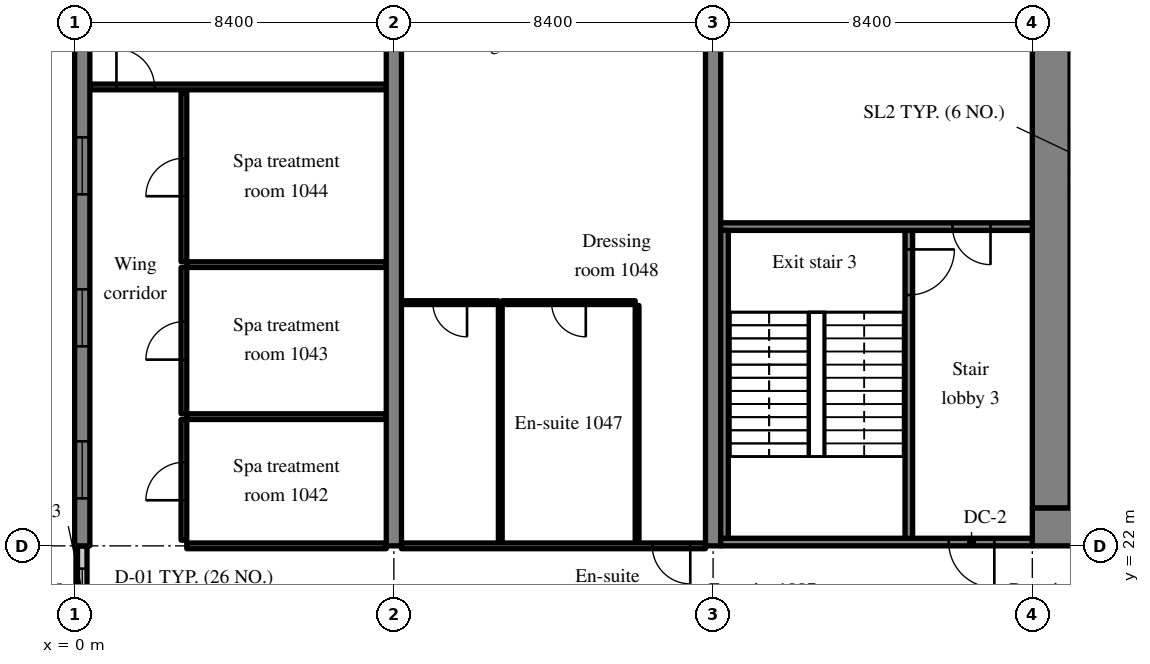
"""IFC4 building model, lengths in metres.
Left out: names, types, materials, properties, quantities, classifications, styles, units other than length and angle.
Written with IfcOpenShell. Run it as: python <this file> out.ifc"""

import sys

from ifc_helpers import new_model, si_unit, direction, frame, frame_2d, origin, place, context, subcontext, project, spatial, rectangle, extrude, source, transform, mapped, element, fill, save


model = new_model("IFC4")
c1 = context("Model", 3, precision=1e-05, world=origin(), true_north=direction((0.0, 1.0)))
c2 = subcontext(c1, "Body", "Model", "MODEL_VIEW")
j1 = project(units=[si_unit("LENGTHUNIT", "METRE"), si_unit("PLANEANGLEUNIT", "RADIAN")], contexts=[c1])
p1 = place(None, origin())
s1 = spatial("IfcSite", under=j1, at=p1, CompositionType="ELEMENT")
p2 = place(p1, origin())
s2 = spatial("IfcBuilding", under=s1, at=p2, CompositionType="ELEMENT")
p3 = place(p2, frame((0.0, 0.0, 46.8)))
s3 = spatial("IfcBuildingStorey", under=s2, at=p3, CompositionType="ELEMENT", Elevation=46.8)
m1 = source(origin(), c2, "Body", "SweptSolid", [
    extrude(rectangle(XDim=50.4, YDim=1.0, at=frame_2d((25.2, 0.0))), origin(), (0.0, 0.0, 1.0), 3.52),
])
p4 = place(p3, frame((25.2, 22.5, 0.0), z_axis=(0.0, 0.0, 1.0), x_axis=(1.0, 0.0, 0.0)))
e1 = element("IfcWall", 1, at=p4, inside=s3, PredefinedType="SHEAR", context=c2, shape_type="MappedRepresentation", body=[
    mapped(m1, transform((0.0, 0.0, 0.0), scale=1.0)),
])
m2 = source(origin(), c2, "Body", "SweptSolid", [
    extrude(rectangle(XDim=1.8, YDim=2.1, at=frame_2d((0.9, 1.05))), frame((0.0, 0.51, 0.0), z_axis=(0.0, -1.0, 0.0), x_axis=(1.0, 0.0, 0.0)), (0.0, 0.0, 1.0), 1.02),
])
p5 = place(p4, frame((15.9, 0.0, 0.0)))
e2 = element("IfcOpeningElement", 2, at=p5, cuts=e1, PredefinedType="OPENING", context=c2, shape_type="MappedRepresentation", body=[
    mapped(m2, transform((0.0, 0.0, 0.0), scale=1.0)),
])
m3 = source(origin(), c2, "Body", "SweptSolid", [
    extrude(rectangle(XDim=1.2, YDim=2.1, at=frame_2d((0.6, 1.05))), frame((0.0, 0.51, 0.0), z_axis=(0.0, -1.0, 0.0), x_axis=(1.0, 0.0, 0.0)), (0.0, 0.0, 1.0), 1.02),
])
p6 = place(p4, frame((26.987, 0.0, 0.0)))
e3 = element("IfcOpeningElement", 3, at=p6, cuts=e1, PredefinedType="OPENING", context=c2, shape_type="MappedRepresentation", body=[
    mapped(m3, transform((0.0, 0.0, 0.0), scale=1.0)),
])
m4 = source(origin(), c2, "Body", "SweptSolid", [
    extrude(rectangle(XDim=0.9, YDim=2.1, at=frame_2d((0.45, 1.05))), frame((0.0, 0.51, 0.0), z_axis=(0.0, -1.0, 0.0), x_axis=(1.0, 0.0, 0.0)), (0.0, 0.0, 1.0), 1.02),
])
p7 = place(p4, frame((33.75, 0.0, 0.0)))
e4 = element("IfcOpeningElement", 4, at=p7, cuts=e1, PredefinedType="OPENING", context=c2, shape_type="MappedRepresentation", body=[
    mapped(m4, transform((0.0, 0.0, 0.0), scale=1.0)),
])
p8 = place(p4, frame((30.75, 0.0, 0.0)))
e5 = element("IfcOpeningElement", 5, at=p8, cuts=e1, PredefinedType="OPENING", context=c2, shape_type="MappedRepresentation", body=[
    mapped(m4, transform((0.0, 0.0, 0.0), scale=1.0)),
])
p9 = place(p4, frame((38.262, 0.0, 0.0)))
e6 = element("IfcOpeningElement", 6, at=p9, cuts=e1, PredefinedType="OPENING", context=c2, shape_type="MappedRepresentation", body=[
    mapped(m4, transform((0.0, 0.0, 0.0), scale=1.0)),
])
p10 = place(p4, frame((6.438, 0.0, 0.0)))
e7 = element("IfcOpeningElement", 7, at=p10, cuts=e1, PredefinedType="OPENING", context=c2, shape_type="MappedRepresentation", body=[
    mapped(m3, transform((0.0, 0.0, 0.0), scale=1.0)),
])
p11 = place(p4, frame((47.725, 0.0, 0.0)))
e8 = element("IfcOpeningElement", 8, at=p11, cuts=e1, PredefinedType="OPENING", context=c2, shape_type="MappedRepresentation", body=[
    mapped(m3, transform((0.0, 0.0, 0.0), scale=1.0)),
])
m5 = source(origin(), c2, "Body", "SweptSolid", [
    extrude(rectangle(XDim=18.0, YDim=1.0, at=frame_2d((9.0, 0.0))), origin(), (0.0, 0.0, 1.0), 3.52),
])
p12 = place(p3, frame((25.7, 23.0, 0.0), z_axis=(0.0, 0.0, 1.0), x_axis=(0.0, 1.0, 0.0)))
e9 = element("IfcWall", 9, at=p12, inside=s3, PredefinedType="SHEAR", context=c2, shape_type="MappedRepresentation", body=[
    mapped(m5, transform((0.0, 0.0, 0.0), scale=1.0)),
])
m6 = source(origin(), c2, "Body", "SweptSolid", [
    extrude(rectangle(XDim=16.0, YDim=0.4, at=frame_2d((8.0, 0.0))), origin(), (0.0, 0.0, 1.0), 3.52),
])
p13 = place(p3, frame((0.2, 22.0, 0.0), z_axis=(0.0, 0.0, 1.0), x_axis=(0.0, 1.0, 0.0)))
e10 = element("IfcWall", 10, at=p13, inside=s3, PredefinedType="SHEAR", context=c2, shape_type="MappedRepresentation", body=[
    mapped(m6, transform((0.0, 0.0, 0.0), scale=1.0)),
])
m7 = source(origin(), c2, "Body", "SweptSolid", [
    extrude(rectangle(XDim=1.5, YDim=1.5, at=frame_2d((0.75, 0.75))), frame((0.0, 0.21, 0.0), z_axis=(0.0, -1.0, 0.0), x_axis=(1.0, 0.0, 0.0)), (0.0, 0.0, 1.0), 0.42),
])
p14 = place(p13, frame((1.25, 0.0, 0.9)))
e11 = element("IfcOpeningElement", 11, at=p14, cuts=e10, PredefinedType="OPENING", context=c2, shape_type="MappedRepresentation", body=[
    mapped(m7, transform((0.0, 0.0, 0.0), scale=1.0)),
])
p15 = place(p13, frame((5.25, 0.0, 0.9)))
e12 = element("IfcOpeningElement", 12, at=p15, cuts=e10, PredefinedType="OPENING", context=c2, shape_type="MappedRepresentation", body=[
    mapped(m7, transform((0.0, 0.0, 0.0), scale=1.0)),
])
p16 = place(p13, frame((9.25, 0.0, 0.9)))
e13 = element("IfcOpeningElement", 13, at=p16, cuts=e10, PredefinedType="OPENING", context=c2, shape_type="MappedRepresentation", body=[
    mapped(m7, transform((0.0, 0.0, 0.0), scale=1.0)),
])
p17 = place(p13, frame((13.25, 0.0, 0.9)))
e14 = element("IfcOpeningElement", 14, at=p17, cuts=e10, PredefinedType="OPENING", context=c2, shape_type="MappedRepresentation", body=[
    mapped(m7, transform((0.0, 0.0, 0.0), scale=1.0)),
])
m8 = source(origin(), c2, "Body", "SweptSolid", [
    extrude(rectangle(XDim=20.0, YDim=0.4, at=frame_2d((10.0, 0.0))), origin(), (0.0, 0.0, 1.0), 3.52),
])
for number, where, z_axis, x_axis in (
    (15, (8.4, 22.0, 0.0), (0.0, 0.0, 1.0), (0.0, 1.0, 0.0)),
    (16, (16.8, 22.0, 0.0), (0.0, 0.0, 1.0), (0.0, 1.0, 0.0)),
):
    element("IfcWall", number, at=place(p3, frame(where, z_axis=z_axis, x_axis=x_axis)), inside=s3, PredefinedType="SHEAR", context=c2, shape_type="MappedRepresentation", body=[
        mapped(m8, transform((0.0, 0.0, 0.0), scale=1.0)),
    ])
m9 = source(origin(), c2, "Body", "SweptSolid", [
    extrude(rectangle(XDim=2.4, YDim=0.25, at=frame_2d((1.2, 0.0))), origin(), (0.0, 0.0, 1.0), 2.62),
])
p18 = place(p3, frame((0.2, 19.6, 0.0), z_axis=(0.0, 0.0, 1.0), x_axis=(0.0, 1.0, 0.0)))
e17 = element("IfcWall", 17, at=p18, inside=s3, PredefinedType="SOLIDWALL", context=c2, shape_type="MappedRepresentation", body=[
    mapped(m9, transform((0.0, 0.0, 0.0), scale=1.0)),
])
m10 = source(origin(), c2, "Body", "SweptSolid", [
    extrude(rectangle(XDim=1.2, YDim=1.5, at=frame_2d((0.6, 0.75))), frame((0.0, 0.135, 0.0), z_axis=(0.0, -1.0, 0.0), x_axis=(1.0, 0.0, 0.0)), (0.0, 0.0, 1.0), 0.27),
])
p19 = place(p18, frame((0.6, 0.0, 0.9)))
e18 = element("IfcOpeningElement", 18, at=p19, cuts=e17, PredefinedType="OPENING", context=c2, shape_type="MappedRepresentation", body=[
    mapped(m10, transform((0.0, 0.0, 0.0), scale=1.0)),
])
m11 = source(origin(), c2, "Body", "SweptSolid", [
    extrude(rectangle(XDim=8.3, YDim=0.2, at=frame_2d((4.15, 0.0))), origin(), (0.0, 0.0, 1.0), 3.52),
])
p20 = place(p3, frame((21.95, 22.1, 0.0), z_axis=(0.0, 0.0, 1.0), x_axis=(0.0, 1.0, 0.0)))
e19 = element("IfcWall", 19, at=p20, inside=s3, PredefinedType="SOLIDWALL", context=c2, shape_type="MappedRepresentation", body=[
    mapped(m11, transform((0.0, 0.0, 0.0), scale=1.0)),
])
m12 = source(origin(), c2, "Body", "SweptSolid", [
    extrude(rectangle(XDim=1.2, YDim=2.1, at=frame_2d((0.6, 1.05))), frame((0.0, 0.11, 0.0), z_axis=(0.0, -1.0, 0.0), x_axis=(1.0, 0.0, 0.0)), (0.0, 0.0, 1.0), 0.22),
])
p21 = place(p20, frame((6.5, 0.0, 0.0)))
e20 = element("IfcOpeningElement", 20, at=p21, cuts=e19, PredefinedType="OPENING", context=c2, shape_type="MappedRepresentation", body=[
    mapped(m12, transform((0.0, 0.0, 0.0), scale=1.0)),
])
m13 = source(origin(), c2, "Body", "SweptSolid", [
    extrude(rectangle(XDim=8.2, YDim=0.2, at=frame_2d((4.1, 0.0))), origin(), (0.0, 0.0, 1.0), 3.52),
])
p22 = place(p3, frame((17.0, 22.1, 0.0), z_axis=(0.0, 0.0, 1.0), x_axis=(1.0, 0.0, 0.0)))
e21 = element("IfcWall", 21, at=p22, inside=s3, PredefinedType="SOLIDWALL", context=c2, shape_type="MappedRepresentation", body=[
    mapped(m13, transform((0.0, 0.0, 0.0), scale=1.0)),
])
p23 = place(p22, frame((6.0, 0.0, 0.0)))
e22 = element("IfcOpeningElement", 22, at=p23, cuts=e21, PredefinedType="OPENING", context=c2, shape_type="MappedRepresentation", body=[
    mapped(m12, transform((0.0, 0.0, 0.0), scale=1.0)),
])
p24 = place(p3, frame((17.0, 30.4, 0.0), z_axis=(0.0, 0.0, 1.0), x_axis=(1.0, 0.0, 0.0)))
e23 = element("IfcWall", 23, at=p24, inside=s3, PredefinedType="SOLIDWALL", context=c2, shape_type="MappedRepresentation", body=[
    mapped(m13, transform((0.0, 0.0, 0.0), scale=1.0)),
])
m14 = source(origin(), c2, "Body", "SweptSolid", [
    extrude(rectangle(XDim=1.0, YDim=2.1, at=frame_2d((0.5, 1.05))), frame((0.0, 0.11, 0.0), z_axis=(0.0, -1.0, 0.0), x_axis=(1.0, 0.0, 0.0)), (0.0, 0.0, 1.0), 0.22),
])
p25 = place(p24, frame((6.1, 0.0, 0.0)))
e24 = element("IfcOpeningElement", 24, at=p25, cuts=e23, PredefinedType="OPENING", context=c2, shape_type="MappedRepresentation", body=[
    mapped(m14, transform((0.0, 0.0, 0.0), scale=1.0)),
])
m15 = source(origin(), c2, "Body", "SweptSolid", [
    extrude(rectangle(XDim=8.1, YDim=0.2, at=frame_2d((4.05, 0.0))), origin(), (0.0, 0.0, 1.0), 3.52),
])
p26 = place(p3, frame((17.1, 22.2, 0.0), z_axis=(0.0, 0.0, 1.0), x_axis=(0.0, 1.0, 0.0)))
e25 = element("IfcWall", 25, at=p26, inside=s3, PredefinedType="SOLIDWALL", context=c2, shape_type="MappedRepresentation", body=[
    mapped(m15, transform((0.0, 0.0, 0.0), scale=1.0)),
])
m16 = source(origin(), c2, "Body", "SweptSolid", [
    extrude(rectangle(XDim=5.25, YDim=0.15, at=frame_2d((2.625, 0.0))), origin(), (0.0, 0.0, 1.0), 2.82),
])
p27 = place(p3, frame((2.95, 22.0, 0.0), z_axis=(0.0, 0.0, 1.0), x_axis=(1.0, 0.0, 0.0)))
e26 = element("IfcWall", 26, at=p27, inside=s3, PredefinedType="PARTITIONING", context=c2, shape_type="MappedRepresentation", body=[
    mapped(m16, transform((0.0, 0.0, 0.0), scale=1.0)),
])
m17 = source(origin(), c2, "Body", "SweptSolid", [
    extrude(rectangle(XDim=3.175, YDim=0.15, at=frame_2d((1.587, 0.0))), origin(), (0.0, 0.0, 1.0), 3.52),
])
p28 = place(p3, frame((2.875, 22.15, 0.0), z_axis=(0.0, 0.0, 1.0), x_axis=(0.0, 1.0, 0.0)))
e27 = element("IfcWall", 27, at=p28, inside=s3, PredefinedType="PARTITIONING", context=c2, shape_type="MappedRepresentation", body=[
    mapped(m17, transform((0.0, 0.0, 0.0), scale=1.0)),
])
m18 = source(origin(), c2, "Body", "SweptSolid", [
    extrude(rectangle(XDim=1.0, YDim=2.1, at=frame_2d((0.5, 1.05))), frame((0.0, 0.085, 0.0), z_axis=(0.0, -1.0, 0.0), x_axis=(1.0, 0.0, 0.0)), (0.0, 0.0, 1.0), 0.17),
])
p29 = place(p28, frame((1.05, 0.0, 0.0)))
e28 = element("IfcOpeningElement", 28, at=p29, cuts=e27, PredefinedType="OPENING", context=c2, shape_type="MappedRepresentation", body=[
    mapped(m18, transform((0.0, 0.0, 0.0), scale=1.0)),
])
m19 = source(origin(), c2, "Body", "SweptSolid", [
    extrude(rectangle(XDim=5.25, YDim=0.15, at=frame_2d((2.625, 0.0))), origin(), (0.0, 0.0, 1.0), 3.52),
])
p30 = place(p3, frame((2.95, 25.4, 0.0), z_axis=(0.0, 0.0, 1.0), x_axis=(1.0, 0.0, 0.0)))
e29 = element("IfcWall", 29, at=p30, inside=s3, PredefinedType="PARTITIONING", context=c2, shape_type="MappedRepresentation", body=[
    mapped(m19, transform((0.0, 0.0, 0.0), scale=1.0)),
])
m20 = source(origin(), c2, "Body", "SweptSolid", [
    extrude(rectangle(XDim=3.85, YDim=0.15, at=frame_2d((1.925, 0.0))), origin(), (0.0, 0.0, 1.0), 3.52),
])
p31 = place(p3, frame((2.875, 25.475, 0.0), z_axis=(0.0, 0.0, 1.0), x_axis=(0.0, 1.0, 0.0)))
e30 = element("IfcWall", 30, at=p31, inside=s3, PredefinedType="PARTITIONING", context=c2, shape_type="MappedRepresentation", body=[
    mapped(m20, transform((0.0, 0.0, 0.0), scale=1.0)),
])
p32 = place(p31, frame((1.425, 0.0, 0.0)))
e31 = element("IfcOpeningElement", 31, at=p32, cuts=e30, PredefinedType="OPENING", context=c2, shape_type="MappedRepresentation", body=[
    mapped(m18, transform((0.0, 0.0, 0.0), scale=1.0)),
])
p33 = place(p3, frame((2.95, 29.4, 0.0), z_axis=(0.0, 0.0, 1.0), x_axis=(1.0, 0.0, 0.0)))
e32 = element("IfcWall", 32, at=p33, inside=s3, PredefinedType="PARTITIONING", context=c2, shape_type="MappedRepresentation", body=[
    mapped(m19, transform((0.0, 0.0, 0.0), scale=1.0)),
])
m21 = source(origin(), c2, "Body", "SweptSolid", [
    extrude(rectangle(XDim=4.45, YDim=0.15, at=frame_2d((2.225, 0.0))), origin(), (0.0, 0.0, 1.0), 3.52),
])
p34 = place(p3, frame((2.875, 29.475, 0.0), z_axis=(0.0, 0.0, 1.0), x_axis=(0.0, 1.0, 0.0)))
e33 = element("IfcWall", 33, at=p34, inside=s3, PredefinedType="PARTITIONING", context=c2, shape_type="MappedRepresentation", body=[
    mapped(m21, transform((0.0, 0.0, 0.0), scale=1.0)),
])
p35 = place(p34, frame((1.725, 0.0, 0.0)))
e34 = element("IfcOpeningElement", 34, at=p35, cuts=e33, PredefinedType="OPENING", context=c2, shape_type="MappedRepresentation", body=[
    mapped(m18, transform((0.0, 0.0, 0.0), scale=1.0)),
])
m22 = source(origin(), c2, "Body", "SweptSolid", [
    extrude(rectangle(XDim=7.8, YDim=0.15, at=frame_2d((3.9, 0.0))), origin(), (0.0, 0.0, 1.0), 3.52),
])
p36 = place(p3, frame((0.4, 34.075, 0.0), z_axis=(0.0, 0.0, 1.0), x_axis=(1.0, 0.0, 0.0)))
e35 = element("IfcWall", 35, at=p36, inside=s3, PredefinedType="PARTITIONING", context=c2, shape_type="MappedRepresentation", body=[
    mapped(m22, transform((0.0, 0.0, 0.0), scale=1.0)),
])
p37 = place(p36, frame((0.7, 0.0, 0.0)))
e36 = element("IfcOpeningElement", 36, at=p37, cuts=e35, PredefinedType="OPENING", context=c2, shape_type="MappedRepresentation", body=[
    mapped(m18, transform((0.0, 0.0, 0.0), scale=1.0)),
])
m23 = source(origin(), c2, "Body", "SweptSolid", [
    extrude(rectangle(XDim=6.25, YDim=0.1, at=frame_2d((3.125, 0.0))), origin(), (0.0, 0.0, 1.0), 3.52),
])
for number, where, z_axis, x_axis in (
    (37, (14.8, 22.075, 0.0), (0.0, 0.0, 1.0), (0.0, 1.0, 0.0)),
    (38, (11.2, 22.075, 0.0), (0.0, 0.0, 1.0), (0.0, 1.0, 0.0)),
):
    element("IfcWall", number, at=place(p3, frame(where, z_axis=z_axis, x_axis=x_axis)), inside=s3, PredefinedType="PARTITIONING", context=c2, shape_type="MappedRepresentation", body=[
        mapped(m23, transform((0.0, 0.0, 0.0), scale=1.0)),
    ])
m24 = source(origin(), c2, "Body", "SweptSolid", [
    extrude(rectangle(XDim=3.5, YDim=0.1, at=frame_2d((1.75, 0.0))), origin(), (0.0, 0.0, 1.0), 3.52),
])
p38 = place(p3, frame((11.25, 28.4, 0.0), z_axis=(0.0, 0.0, 1.0), x_axis=(1.0, 0.0, 0.0)))
e39 = element("IfcWall", 39, at=p38, inside=s3, PredefinedType="PARTITIONING", context=c2, shape_type="MappedRepresentation", body=[
    mapped(m24, transform((0.0, 0.0, 0.0), scale=1.0)),
])
m25 = source(origin(), c2, "Body", "SweptSolid", [
    extrude(rectangle(XDim=0.9, YDim=2.1, at=frame_2d((0.45, 1.05))), frame((0.0, 0.06, 0.0), z_axis=(0.0, -1.0, 0.0), x_axis=(1.0, 0.0, 0.0)), (0.0, 0.0, 1.0), 0.12),
])
p39 = place(p38, frame((1.3, 0.0, 0.0)))
e40 = element("IfcOpeningElement", 40, at=p39, cuts=e39, PredefinedType="OPENING", context=c2, shape_type="MappedRepresentation", body=[
    mapped(m25, transform((0.0, 0.0, 0.0), scale=1.0)),
])
m26 = source(origin(), c2, "Body", "SweptSolid", [
    extrude(rectangle(XDim=2.55, YDim=0.1, at=frame_2d((1.275, 0.0))), origin(), (0.0, 0.0, 1.0), 3.52),
])
p40 = place(p3, frame((8.6, 28.4, 0.0), z_axis=(0.0, 0.0, 1.0), x_axis=(1.0, 0.0, 0.0)))
e41 = element("IfcWall", 41, at=p40, inside=s3, PredefinedType="PARTITIONING", context=c2, shape_type="MappedRepresentation", body=[
    mapped(m26, transform((0.0, 0.0, 0.0), scale=1.0)),
])
p41 = place(p40, frame((0.825, 0.0, 0.0)))
e42 = element("IfcOpeningElement", 42, at=p41, cuts=e41, PredefinedType="OPENING", context=c2, shape_type="MappedRepresentation", body=[
    mapped(m25, transform((0.0, 0.0, 0.0), scale=1.0)),
])
m27 = source(origin(), c2, "Body", "SweptSolid", [
    extrude(rectangle(XDim=8.0, YDim=0.15, at=frame_2d((4.0, 0.0))), origin(), (0.0, 0.0, 1.0), 2.82),
])
p42 = place(p3, frame((8.6, 22.0, 0.0), z_axis=(0.0, 0.0, 1.0), x_axis=(1.0, 0.0, 0.0)))
e43 = element("IfcWall", 43, at=p42, inside=s3, PredefinedType="PARTITIONING", context=c2, shape_type="MappedRepresentation", body=[
    mapped(m27, transform((0.0, 0.0, 0.0), scale=1.0)),
])
p43 = place(p42, frame((6.6, 0.0, 0.0)))
e44 = element("IfcOpeningElement", 44, at=p43, cuts=e43, PredefinedType="OPENING", context=c2, shape_type="MappedRepresentation", body=[
    mapped(m18, transform((0.0, 0.0, 0.0), scale=1.0)),
])
m28 = source(origin(), c2, "Body", "SweptSolid", [
    extrude(rectangle(XDim=1.5, YDim=1.5, at=frame_2d((0.75, 0.75))), frame((0.0, 0.03, 0.0), z_axis=(0.0, -1.0, 0.0), x_axis=(1.0, 0.0, 0.0)), (0.0, 0.0, 1.0), 0.06),
])
p44 = place(p14, origin())
e45 = element("IfcWindow", 45, at=p44, inside=s3, PartitioningType="SINGLE_PANEL", PredefinedType="WINDOW", context=c2, shape_type="MappedRepresentation", body=[
    mapped(m28, transform((0.0, 0.0, 0.0), scale=1.0)),
])
fill(e11, e45)
p45 = place(p15, origin())
e46 = element("IfcWindow", 46, at=p45, inside=s3, PartitioningType="SINGLE_PANEL", PredefinedType="WINDOW", context=c2, shape_type="MappedRepresentation", body=[
    mapped(m28, transform((0.0, 0.0, 0.0), scale=1.0)),
])
fill(e12, e46)
p46 = place(p16, origin())
e47 = element("IfcWindow", 47, at=p46, inside=s3, PartitioningType="SINGLE_PANEL", PredefinedType="WINDOW", context=c2, shape_type="MappedRepresentation", body=[
    mapped(m28, transform((0.0, 0.0, 0.0), scale=1.0)),
])
fill(e13, e47)
m29 = source(origin(), c2, "Body", "SweptSolid", [
    extrude(rectangle(XDim=1.2, YDim=1.5, at=frame_2d((0.6, 0.75))), frame((0.0, 0.03, 0.0), z_axis=(0.0, -1.0, 0.0), x_axis=(1.0, 0.0, 0.0)), (0.0, 0.0, 1.0), 0.06),
])
p47 = place(p19, origin())
e48 = element("IfcWindow", 48, at=p47, inside=s3, PartitioningType="SINGLE_PANEL", PredefinedType="WINDOW", context=c2, shape_type="MappedRepresentation", body=[
    mapped(m29, transform((0.0, 0.0, 0.0), scale=1.0)),
])
fill(e18, e48)
m30 = source(origin(), c2, "Body", "SweptSolid", [
    extrude(rectangle(XDim=1.2, YDim=2.1, at=frame_2d((0.6, 1.05))), frame((0.0, 0.025, 0.0), z_axis=(0.0, -1.0, 0.0), x_axis=(1.0, 0.0, 0.0)), (0.0, 0.0, 1.0), 0.05),
])
p48 = place(p21, origin())
e49 = element("IfcDoor", 49, at=p48, inside=s3, OperationType="SINGLE_SWING_RIGHT", PredefinedType="DOOR", context=c2, shape_type="MappedRepresentation", body=[
    mapped(m30, transform((0.0, 0.0, 0.0), scale=1.0)),
])
fill(e20, e49)
p49 = place(p23, origin())
e50 = element("IfcDoor", 50, at=p49, inside=s3, OperationType="SINGLE_SWING_RIGHT", PredefinedType="DOOR", context=c2, shape_type="MappedRepresentation", body=[
    mapped(m30, transform((0.0, 0.0, 0.0), scale=1.0)),
])
fill(e22, e50)
m31 = source(origin(), c2, "Body", "SweptSolid", [
    extrude(rectangle(XDim=1.0, YDim=2.1, at=frame_2d((0.5, 1.05))), frame((0.0, 0.025, 0.0), z_axis=(0.0, -1.0, 0.0), x_axis=(1.0, 0.0, 0.0)), (0.0, 0.0, 1.0), 0.05),
])
p50 = place(p25, origin())
e51 = element("IfcDoor", 51, at=p50, inside=s3, OperationType="SINGLE_SWING_RIGHT", PredefinedType="DOOR", context=c2, shape_type="MappedRepresentation", body=[
    mapped(m31, transform((0.0, 0.0, 0.0), scale=1.0)),
])
fill(e24, e51)
p51 = place(p29, origin())
e52 = element("IfcDoor", 52, at=p51, inside=s3, OperationType="SINGLE_SWING_LEFT", PredefinedType="DOOR", context=c2, shape_type="MappedRepresentation", body=[
    mapped(m31, transform((0.0, 0.0, 0.0), scale=1.0)),
])
fill(e28, e52)
p52 = place(p32, origin())
e53 = element("IfcDoor", 53, at=p52, inside=s3, OperationType="SINGLE_SWING_LEFT", PredefinedType="DOOR", context=c2, shape_type="MappedRepresentation", body=[
    mapped(m31, transform((0.0, 0.0, 0.0), scale=1.0)),
])
fill(e31, e53)
p53 = place(p35, origin())
e54 = element("IfcDoor", 54, at=p53, inside=s3, OperationType="SINGLE_SWING_LEFT", PredefinedType="DOOR", context=c2, shape_type="MappedRepresentation", body=[
    mapped(m31, transform((0.0, 0.0, 0.0), scale=1.0)),
])
fill(e34, e54)
p54 = place(p37, origin())
e55 = element("IfcDoor", 55, at=p54, inside=s3, OperationType="SINGLE_SWING_LEFT", PredefinedType="DOOR", context=c2, shape_type="MappedRepresentation", body=[
    mapped(m31, transform((0.0, 0.0, 0.0), scale=1.0)),
])
fill(e36, e55)
m32 = source(origin(), c2, "Body", "SweptSolid", [
    extrude(rectangle(XDim=0.9, YDim=2.1, at=frame_2d((0.45, 1.05))), frame((0.0, 0.025, 0.0), z_axis=(0.0, -1.0, 0.0), x_axis=(1.0, 0.0, 0.0)), (0.0, 0.0, 1.0), 0.05),
])
p55 = place(p39, origin())
e56 = element("IfcDoor", 56, at=p55, inside=s3, OperationType="SINGLE_SWING_RIGHT", PredefinedType="DOOR", context=c2, shape_type="MappedRepresentation", body=[
    mapped(m32, transform((0.0, 0.0, 0.0), scale=1.0)),
])
fill(e40, e56)
p56 = place(p41, origin())
e57 = element("IfcDoor", 57, at=p56, inside=s3, OperationType="SINGLE_SWING_RIGHT", PredefinedType="DOOR", context=c2, shape_type="MappedRepresentation", body=[
    mapped(m32, transform((0.0, 0.0, 0.0), scale=1.0)),
])
fill(e42, e57)
p57 = place(p43, origin())
e58 = element("IfcDoor", 58, at=p57, inside=s3, OperationType="SINGLE_SWING_RIGHT", PredefinedType="DOOR", context=c2, shape_type="MappedRepresentation", body=[
    mapped(m31, transform((0.0, 0.0, 0.0), scale=1.0)),
])
fill(e44, e58)
save(model, sys.argv[1])
